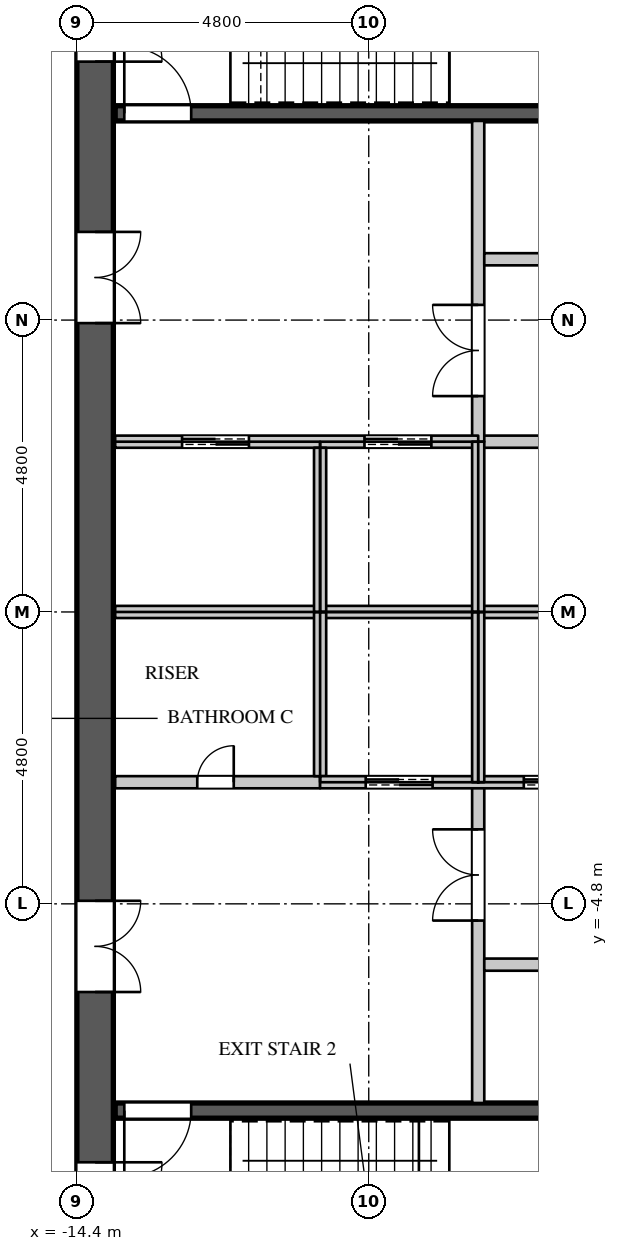
"""IFC4 building model, lengths in metres.
Left out: names, types, materials, properties, quantities, classifications, styles, units other than length and angle.
Written with IfcOpenShell. Run it as: python <this file> out.ifc"""

import sys

from ifc_helpers import new_model, si_unit, direction, frame, frame_2d, origin, place, context, subcontext, project, spatial, rectangle, extrude, element, fill, save


model = new_model("IFC4")
c1 = context("Model", 3, precision=1e-05, world=origin(), true_north=direction((0.0, 1.0)))
c2 = subcontext(c1, "Body", "Model", "MODEL_VIEW")
j1 = project(units=[si_unit("LENGTHUNIT", "METRE"), si_unit("PLANEANGLEUNIT", "RADIAN")], contexts=[c1])
p1 = place(None, origin())
s1 = spatial("IfcSite", under=j1, at=p1, CompositionType="ELEMENT")
p2 = place(p1, origin())
s2 = spatial("IfcBuilding", under=s1, at=p2, CompositionType="ELEMENT")
p3 = place(p2, frame((0.0, 0.0, 218.1)))
s3 = spatial("IfcBuildingStorey", under=s2, at=p3, CompositionType="ELEMENT", Elevation=218.1)
p4 = place(p3, frame((-14.1, -11.4, 0.0), z_axis=(0.0, 0.0, 1.0), x_axis=(0.0, 1.0, 0.0)))
e1 = element("IfcWall", 1, at=p4, inside=s3, PredefinedType="SHEAR", context=c2, shape_type="SweptSolid", body=[
    extrude(rectangle(XDim=22.8, YDim=0.6, at=frame_2d((11.4, 0.0))), origin(), (0.0, 0.0, 1.0), 4.2),
])
p5 = place(p4, frame((20.45, 0.0, 0.0)))
e2 = element("IfcOpeningElement", 2, at=p5, cuts=e1, PredefinedType="OPENING", context=c2, shape_type="SweptSolid", body=[
    extrude(rectangle(XDim=1.1, YDim=2.2, at=frame_2d((0.55, 1.1))), frame((0.0, 0.31, 0.0), z_axis=(0.0, -1.0, 0.0), x_axis=(1.0, 0.0, 0.0)), (0.0, 0.0, 1.0), 0.62),
])
p6 = place(p4, frame((1.25, 0.0, 0.0)))
e3 = element("IfcOpeningElement", 3, at=p6, cuts=e1, PredefinedType="OPENING", context=c2, shape_type="SweptSolid", body=[
    extrude(rectangle(XDim=1.1, YDim=2.2, at=frame_2d((0.55, 1.1))), frame((0.0, 0.31, 0.0), z_axis=(0.0, -1.0, 0.0), x_axis=(1.0, 0.0, 0.0)), (0.0, 0.0, 1.0), 0.62),
])
p7 = place(p4, frame((16.15, 0.0, 0.0)))
e4 = element("IfcOpeningElement", 4, at=p7, cuts=e1, PredefinedType="OPENING", context=c2, shape_type="SweptSolid", body=[
    extrude(rectangle(XDim=1.5, YDim=2.4, at=frame_2d((0.75, 1.2))), frame((0.0, 0.31, 0.0), z_axis=(0.0, -1.0, 0.0), x_axis=(1.0, 0.0, 0.0)), (0.0, 0.0, 1.0), 0.62),
])
p8 = place(p4, frame((5.15, 0.0, 0.0)))
e5 = element("IfcOpeningElement", 5, at=p8, cuts=e1, PredefinedType="OPENING", context=c2, shape_type="SweptSolid", body=[
    extrude(rectangle(XDim=1.5, YDim=2.4, at=frame_2d((0.75, 1.2))), frame((0.0, 0.31, 0.0), z_axis=(0.0, -1.0, 0.0), x_axis=(1.0, 0.0, 0.0)), (0.0, 0.0, 1.0), 0.62),
])
p9 = place(p3, frame((-7.8, 2.8, 0.0), z_axis=(0.0, 0.0, 1.0), x_axis=(1.0, 0.0, 0.0)))
e6 = element("IfcWall", 6, at=p9, inside=s3, PredefinedType="PARTITIONING", context=c2, shape_type="SweptSolid", body=[
    extrude(rectangle(XDim=4.82, YDim=0.2, at=frame_2d((2.41, 0.0))), origin(), (0.0, 0.0, 1.0), 3.95),
])
p10 = place(p9, frame((1.95, 0.0, 0.0)))
e7 = element("IfcOpeningElement", 7, at=p10, cuts=e6, PredefinedType="OPENING", context=c2, shape_type="SweptSolid", body=[
    extrude(rectangle(XDim=0.9, YDim=2.2, at=frame_2d((0.45, 1.1))), frame((0.0, 0.11, 0.0), z_axis=(0.0, -1.0, 0.0), x_axis=(1.0, 0.0, 0.0)), (0.0, 0.0, 1.0), 0.22),
])
p11 = place(p3, frame((-7.8, -8.075, 0.0), z_axis=(0.0, 0.0, 1.0), x_axis=(0.0, 1.0, 0.0)))
e8 = element("IfcWall", 8, at=p11, inside=s3, PredefinedType="PARTITIONING", context=c2, shape_type="SweptSolid", body=[
    extrude(rectangle(XDim=5.275, YDim=0.2, at=frame_2d((2.637, 0.0))), origin(), (0.0, 0.0, 1.0), 3.95),
])
p12 = place(p11, frame((3.0, 0.0, 0.0)))
e9 = element("IfcOpeningElement", 9, at=p12, cuts=e8, PredefinedType="OPENING", context=c2, shape_type="SweptSolid", body=[
    extrude(rectangle(XDim=1.5, YDim=2.4, at=frame_2d((0.75, 1.2))), frame((0.0, 0.11, 0.0), z_axis=(0.0, -1.0, 0.0), x_axis=(1.0, 0.0, 0.0)), (0.0, 0.0, 1.0), 0.22),
])
p13 = place(p3, frame((-7.7, -5.8, 0.0), z_axis=(0.0, 0.0, 1.0), x_axis=(1.0, 0.0, 0.0)))
e10 = element("IfcWall", 10, at=p13, inside=s3, PredefinedType="PARTITIONING", context=c2, shape_type="SweptSolid", body=[
    extrude(rectangle(XDim=21.47, YDim=0.2, at=frame_2d((10.735, 0.0))), origin(), (0.0, 0.0, 1.0), 3.95),
])
p14 = place(p13, frame((1.75, 0.0, 0.0)))
e11 = element("IfcOpeningElement", 11, at=p14, cuts=e10, PredefinedType="OPENING", context=c2, shape_type="SweptSolid", body=[
    extrude(rectangle(XDim=0.9, YDim=2.2, at=frame_2d((0.45, 1.1))), frame((0.0, 0.11, 0.0), z_axis=(0.0, -1.0, 0.0), x_axis=(1.0, 0.0, 0.0)), (0.0, 0.0, 1.0), 0.22),
])
p15 = place(p13, frame((5.95, 0.0, 0.0)))
e12 = element("IfcOpeningElement", 12, at=p15, cuts=e10, PredefinedType="OPENING", context=c2, shape_type="SweptSolid", body=[
    extrude(rectangle(XDim=0.9, YDim=2.2, at=frame_2d((0.45, 1.1))), frame((0.0, 0.11, 0.0), z_axis=(0.0, -1.0, 0.0), x_axis=(1.0, 0.0, 0.0)), (0.0, 0.0, 1.0), 0.22),
])
p16 = place(p13, frame((10.35, 0.0, 0.0)))
e13 = element("IfcOpeningElement", 13, at=p16, cuts=e10, PredefinedType="OPENING", context=c2, shape_type="SweptSolid", body=[
    extrude(rectangle(XDim=0.9, YDim=2.2, at=frame_2d((0.45, 1.1))), frame((0.0, 0.11, 0.0), z_axis=(0.0, -1.0, 0.0), x_axis=(1.0, 0.0, 0.0)), (0.0, 0.0, 1.0), 0.22),
])
p17 = place(p13, frame((14.65, 0.0, 0.0)))
e14 = element("IfcOpeningElement", 14, at=p17, cuts=e10, PredefinedType="OPENING", context=c2, shape_type="SweptSolid", body=[
    extrude(rectangle(XDim=0.9, YDim=2.2, at=frame_2d((0.45, 1.1))), frame((0.0, 0.11, 0.0), z_axis=(0.0, -1.0, 0.0), x_axis=(1.0, 0.0, 0.0)), (0.0, 0.0, 1.0), 0.22),
])
p18 = place(p13, frame((18.75, 0.0, 0.0)))
e15 = element("IfcOpeningElement", 15, at=p18, cuts=e10, PredefinedType="OPENING", context=c2, shape_type="SweptSolid", body=[
    extrude(rectangle(XDim=0.9, YDim=2.2, at=frame_2d((0.45, 1.1))), frame((0.0, 0.11, 0.0), z_axis=(0.0, -1.0, 0.0), x_axis=(1.0, 0.0, 0.0)), (0.0, 0.0, 1.0), 0.22),
])
p19 = place(p3, frame((-7.8, 2.8, 0.0), z_axis=(0.0, 0.0, 1.0), x_axis=(0.0, 1.0, 0.0)))
e16 = element("IfcWall", 16, at=p19, inside=s3, PredefinedType="PARTITIONING", context=c2, shape_type="SweptSolid", body=[
    extrude(rectangle(XDim=5.275, YDim=0.2, at=frame_2d((2.637, 0.0))), origin(), (0.0, 0.0, 1.0), 3.95),
])
p20 = place(p19, frame((0.75, 0.0, 0.0)))
e17 = element("IfcOpeningElement", 17, at=p20, cuts=e16, PredefinedType="OPENING", context=c2, shape_type="SweptSolid", body=[
    extrude(rectangle(XDim=1.5, YDim=2.4, at=frame_2d((0.75, 1.2))), frame((0.0, 0.11, 0.0), z_axis=(0.0, -1.0, 0.0), x_axis=(1.0, 0.0, 0.0)), (0.0, 0.0, 1.0), 0.22),
])
p21 = place(p3, frame((-7.7, 5.8, 0.0), z_axis=(0.0, 0.0, 1.0), x_axis=(1.0, 0.0, 0.0)))
e18 = element("IfcWall", 18, at=p21, inside=s3, PredefinedType="PARTITIONING", context=c2, shape_type="SweptSolid", body=[
    extrude(rectangle(XDim=21.47, YDim=0.2, at=frame_2d((10.735, 0.0))), origin(), (0.0, 0.0, 1.0), 3.95),
])
p22 = place(p21, frame((4.95, 0.0, 0.0)))
e19 = element("IfcOpeningElement", 19, at=p22, cuts=e18, PredefinedType="OPENING", context=c2, shape_type="SweptSolid", body=[
    extrude(rectangle(XDim=0.9, YDim=2.2, at=frame_2d((0.45, 1.1))), frame((0.0, 0.11, 0.0), z_axis=(0.0, -1.0, 0.0), x_axis=(1.0, 0.0, 0.0)), (0.0, 0.0, 1.0), 0.22),
])
p23 = place(p21, frame((15.55, 0.0, 0.0)))
e20 = element("IfcOpeningElement", 20, at=p23, cuts=e18, PredefinedType="OPENING", context=c2, shape_type="SweptSolid", body=[
    extrude(rectangle(XDim=0.9, YDim=2.2, at=frame_2d((0.45, 1.1))), frame((0.0, 0.11, 0.0), z_axis=(0.0, -1.0, 0.0), x_axis=(1.0, 0.0, 0.0)), (0.0, 0.0, 1.0), 0.22),
])
p24 = place(p3, frame((-13.77, -2.8, 0.0), z_axis=(0.0, 0.0, 1.0), x_axis=(1.0, 0.0, 0.0)))
e21 = element("IfcWall", 21, at=p24, inside=s3, PredefinedType="PARTITIONING", context=c2, shape_type="SweptSolid", body=[
    extrude(rectangle(XDim=3.37, YDim=0.2, at=frame_2d((1.685, 0.0))), origin(), (0.0, 0.0, 1.0), 3.95),
])
p25 = place(p24, frame((1.35, 0.0, 0.0)))
e22 = element("IfcOpeningElement", 22, at=p25, cuts=e21, PredefinedType="OPENING", context=c2, shape_type="SweptSolid", body=[
    extrude(rectangle(XDim=0.6, YDim=2.0, at=frame_2d((0.3, 1.0))), frame((0.0, 0.11, 0.0), z_axis=(0.0, -1.0, 0.0), x_axis=(1.0, 0.0, 0.0)), (0.0, 0.0, 1.0), 0.22),
])
p26 = place(p3, frame((-13.77, 0.0, 0.0), z_axis=(0.0, 0.0, 1.0), x_axis=(1.0, 0.0, 0.0)))
e23 = element("IfcWall", 23, at=p26, inside=s3, PredefinedType="PARTITIONING", context=c2, shape_type="SweptSolid", body=[
    extrude(rectangle(XDim=21.57, YDim=0.2, at=frame_2d((10.785, 0.0))), origin(), (0.0, 0.0, 1.0), 3.95),
])
p27 = place(p3, frame((-13.77, 2.8, 0.0), z_axis=(0.0, 0.0, 1.0), x_axis=(1.0, 0.0, 0.0)))
e24 = element("IfcWall", 24, at=p27, inside=s3, PredefinedType="PARTITIONING", context=c2, shape_type="SweptSolid", body=[
    extrude(rectangle(XDim=5.97, YDim=0.2, at=frame_2d((2.985, 0.0))), origin(), (0.0, 0.0, 1.0), 3.95),
])
p28 = place(p27, frame((1.1, 0.0, 0.0)))
e25 = element("IfcOpeningElement", 25, at=p28, cuts=e24, PredefinedType="OPENING", context=c2, shape_type="SweptSolid", body=[
    extrude(rectangle(XDim=1.1, YDim=2.2, at=frame_2d((0.55, 1.1))), frame((0.0, 0.11, 0.0), z_axis=(0.0, -1.0, 0.0), x_axis=(1.0, 0.0, 0.0)), (0.0, 0.0, 1.0), 0.22),
])
p29 = place(p27, frame((4.1, 0.0, 0.0)))
e26 = element("IfcOpeningElement", 26, at=p29, cuts=e24, PredefinedType="OPENING", context=c2, shape_type="SweptSolid", body=[
    extrude(rectangle(XDim=1.1, YDim=2.2, at=frame_2d((0.55, 1.1))), frame((0.0, 0.11, 0.0), z_axis=(0.0, -1.0, 0.0), x_axis=(1.0, 0.0, 0.0)), (0.0, 0.0, 1.0), 0.22),
])
p30 = place(p3, frame((-10.4, -2.7, 0.0), z_axis=(0.0, 0.0, 1.0), x_axis=(0.0, 1.0, 0.0)))
e27 = element("IfcWall", 27, at=p30, inside=s3, PredefinedType="PARTITIONING", context=c2, shape_type="SweptSolid", body=[
    extrude(rectangle(XDim=2.7, YDim=0.2, at=frame_2d((1.35, 0.0))), origin(), (0.0, 0.0, 1.0), 3.95),
])
p31 = place(p3, frame((-10.4, -2.8, 0.0), z_axis=(0.0, 0.0, 1.0), x_axis=(1.0, 0.0, 0.0)))
e28 = element("IfcWall", 28, at=p31, inside=s3, PredefinedType="PARTITIONING", context=c2, shape_type="SweptSolid", body=[
    extrude(rectangle(XDim=18.2, YDim=0.2, at=frame_2d((9.1, 0.0))), origin(), (0.0, 0.0, 1.0), 3.95),
])
p32 = place(p31, frame((0.75, 0.0, 0.0)))
e29 = element("IfcOpeningElement", 29, at=p32, cuts=e28, PredefinedType="OPENING", context=c2, shape_type="SweptSolid", body=[
    extrude(rectangle(XDim=1.1, YDim=2.2, at=frame_2d((0.55, 1.1))), frame((0.0, 0.11, 0.0), z_axis=(0.0, -1.0, 0.0), x_axis=(1.0, 0.0, 0.0)), (0.0, 0.0, 1.0), 0.22),
])
p33 = place(p31, frame((3.35, 0.0, 0.0)))
e30 = element("IfcOpeningElement", 30, at=p33, cuts=e28, PredefinedType="OPENING", context=c2, shape_type="SweptSolid", body=[
    extrude(rectangle(XDim=1.1, YDim=2.2, at=frame_2d((0.55, 1.1))), frame((0.0, 0.11, 0.0), z_axis=(0.0, -1.0, 0.0), x_axis=(1.0, 0.0, 0.0)), (0.0, 0.0, 1.0), 0.22),
])
p34 = place(p31, frame((5.95, 0.0, 0.0)))
e31 = element("IfcOpeningElement", 31, at=p34, cuts=e28, PredefinedType="OPENING", context=c2, shape_type="SweptSolid", body=[
    extrude(rectangle(XDim=1.1, YDim=2.2, at=frame_2d((0.55, 1.1))), frame((0.0, 0.11, 0.0), z_axis=(0.0, -1.0, 0.0), x_axis=(1.0, 0.0, 0.0)), (0.0, 0.0, 1.0), 0.22),
])
p35 = place(p31, frame((8.55, 0.0, 0.0)))
e32 = element("IfcOpeningElement", 32, at=p35, cuts=e28, PredefinedType="OPENING", context=c2, shape_type="SweptSolid", body=[
    extrude(rectangle(XDim=1.1, YDim=2.2, at=frame_2d((0.55, 1.1))), frame((0.0, 0.11, 0.0), z_axis=(0.0, -1.0, 0.0), x_axis=(1.0, 0.0, 0.0)), (0.0, 0.0, 1.0), 0.22),
])
p36 = place(p31, frame((11.15, 0.0, 0.0)))
e33 = element("IfcOpeningElement", 33, at=p36, cuts=e28, PredefinedType="OPENING", context=c2, shape_type="SweptSolid", body=[
    extrude(rectangle(XDim=1.1, YDim=2.2, at=frame_2d((0.55, 1.1))), frame((0.0, 0.11, 0.0), z_axis=(0.0, -1.0, 0.0), x_axis=(1.0, 0.0, 0.0)), (0.0, 0.0, 1.0), 0.22),
])
p37 = place(p31, frame((13.75, 0.0, 0.0)))
e34 = element("IfcOpeningElement", 34, at=p37, cuts=e28, PredefinedType="OPENING", context=c2, shape_type="SweptSolid", body=[
    extrude(rectangle(XDim=1.1, YDim=2.2, at=frame_2d((0.55, 1.1))), frame((0.0, 0.11, 0.0), z_axis=(0.0, -1.0, 0.0), x_axis=(1.0, 0.0, 0.0)), (0.0, 0.0, 1.0), 0.22),
])
p38 = place(p31, frame((16.35, 0.0, 0.0)))
e35 = element("IfcOpeningElement", 35, at=p38, cuts=e28, PredefinedType="OPENING", context=c2, shape_type="SweptSolid", body=[
    extrude(rectangle(XDim=1.1, YDim=2.2, at=frame_2d((0.55, 1.1))), frame((0.0, 0.11, 0.0), z_axis=(0.0, -1.0, 0.0), x_axis=(1.0, 0.0, 0.0)), (0.0, 0.0, 1.0), 0.22),
])
p39 = place(p3, frame((-10.4, 0.0, 0.0), z_axis=(0.0, 0.0, 1.0), x_axis=(0.0, 1.0, 0.0)))
e36 = element("IfcWall", 36, at=p39, inside=s3, PredefinedType="PARTITIONING", context=c2, shape_type="SweptSolid", body=[
    extrude(rectangle(XDim=2.7, YDim=0.2, at=frame_2d((1.35, 0.0))), origin(), (0.0, 0.0, 1.0), 3.95),
])
for number, where, z_axis, x_axis in (
    (37, (-7.8, -2.8, 0.0), (0.0, 0.0, 1.0), (0.0, 1.0, 0.0)),
    (38, (-7.8, 0.0, 0.0), (0.0, 0.0, 1.0), (0.0, 1.0, 0.0)),
):
    element("IfcWall", number, at=place(p3, frame(where, z_axis=z_axis, x_axis=x_axis)), inside=s3, PredefinedType="PARTITIONING", context=c2, shape_type="SweptSolid", body=[
        extrude(rectangle(XDim=2.8, YDim=0.2, at=frame_2d((1.4, 0.0))), origin(), (0.0, 0.0, 1.0), 3.95),
    ])
p40 = place(p3, frame((-13.77, -8.2, 0.0), z_axis=(0.0, 0.0, 1.0), x_axis=(1.0, 0.0, 0.0)))
e39 = element("IfcWall", 39, at=p40, inside=s3, PredefinedType="SHEAR", context=c2, shape_type="SweptSolid", body=[
    extrude(rectangle(XDim=8.495, YDim=0.25, at=frame_2d((4.248, 0.0))), origin(), (0.0, 0.0, 1.0), 3.95),
])
p41 = place(p40, frame((0.15, 0.0, 0.0)))
e40 = element("IfcOpeningElement", 40, at=p41, cuts=e39, PredefinedType="OPENING", context=c2, shape_type="SweptSolid", body=[
    extrude(rectangle(XDim=1.1, YDim=2.2, at=frame_2d((0.55, 1.1))), frame((0.0, 0.135, 0.0), z_axis=(0.0, -1.0, 0.0), x_axis=(1.0, 0.0, 0.0)), (0.0, 0.0, 1.0), 0.27),
])
p42 = place(p3, frame((-13.77, 8.2, 0.0), z_axis=(0.0, 0.0, 1.0), x_axis=(1.0, 0.0, 0.0)))
e41 = element("IfcWall", 41, at=p42, inside=s3, PredefinedType="SHEAR", context=c2, shape_type="SweptSolid", body=[
    extrude(rectangle(XDim=8.495, YDim=0.25, at=frame_2d((4.248, 0.0))), origin(), (0.0, 0.0, 1.0), 3.95),
])
p43 = place(p42, frame((0.15, 0.0, 0.0)))
e42 = element("IfcOpeningElement", 42, at=p43, cuts=e41, PredefinedType="OPENING", context=c2, shape_type="SweptSolid", body=[
    extrude(rectangle(XDim=1.1, YDim=2.2, at=frame_2d((0.55, 1.1))), frame((0.0, 0.135, 0.0), z_axis=(0.0, -1.0, 0.0), x_axis=(1.0, 0.0, 0.0)), (0.0, 0.0, 1.0), 0.27),
])
p44 = place(p25, origin())
e43 = element("IfcDoor", 43, at=p44, inside=s3, OperationType="SINGLE_SWING_RIGHT", PredefinedType="DOOR", context=c2, shape_type="SweptSolid", body=[
    extrude(rectangle(XDim=0.6, YDim=2.0, at=frame_2d((0.3, 1.0))), frame((0.0, 0.025, 0.0), z_axis=(0.0, -1.0, 0.0), x_axis=(1.0, 0.0, 0.0)), (0.0, 0.0, 1.0), 0.05),
])
fill(e22, e43)
p45 = place(p28, origin())
e44 = element("IfcDoor", 44, at=p45, inside=s3, OperationType="DOUBLE_DOOR_SLIDING", PredefinedType="DOOR", context=c2, shape_type="SweptSolid", body=[
    extrude(rectangle(XDim=1.1, YDim=2.2, at=frame_2d((0.55, 1.1))), frame((0.0, 0.025, 0.0), z_axis=(0.0, -1.0, 0.0), x_axis=(1.0, 0.0, 0.0)), (0.0, 0.0, 1.0), 0.05),
])
fill(e25, e44)
p46 = place(p29, origin())
e45 = element("IfcDoor", 45, at=p46, inside=s3, OperationType="DOUBLE_DOOR_SLIDING", PredefinedType="DOOR", context=c2, shape_type="SweptSolid", body=[
    extrude(rectangle(XDim=1.1, YDim=2.2, at=frame_2d((0.55, 1.1))), frame((0.0, 0.025, 0.0), z_axis=(0.0, -1.0, 0.0), x_axis=(1.0, 0.0, 0.0)), (0.0, 0.0, 1.0), 0.05),
])
fill(e26, e45)
p47 = place(p32, origin())
e46 = element("IfcDoor", 46, at=p47, inside=s3, OperationType="DOUBLE_DOOR_SLIDING", PredefinedType="DOOR", context=c2, shape_type="SweptSolid", body=[
    extrude(rectangle(XDim=1.1, YDim=2.2, at=frame_2d((0.55, 1.1))), frame((0.0, 0.025, 0.0), z_axis=(0.0, -1.0, 0.0), x_axis=(1.0, 0.0, 0.0)), (0.0, 0.0, 1.0), 0.05),
])
fill(e29, e46)
p48 = place(p33, origin())
e47 = element("IfcDoor", 47, at=p48, inside=s3, OperationType="DOUBLE_DOOR_SLIDING", PredefinedType="DOOR", context=c2, shape_type="SweptSolid", body=[
    extrude(rectangle(XDim=1.1, YDim=2.2, at=frame_2d((0.55, 1.1))), frame((0.0, 0.025, 0.0), z_axis=(0.0, -1.0, 0.0), x_axis=(1.0, 0.0, 0.0)), (0.0, 0.0, 1.0), 0.05),
])
fill(e30, e47)
p49 = place(p43, origin())
e48 = element("IfcDoor", 48, at=p49, inside=s3, OperationType="SINGLE_SWING_LEFT", PredefinedType="DOOR", context=c2, shape_type="SweptSolid", body=[
    extrude(rectangle(XDim=1.1, YDim=2.2, at=frame_2d((0.55, 1.1))), frame((0.0, 0.025, 0.0), z_axis=(0.0, -1.0, 0.0), x_axis=(1.0, 0.0, 0.0)), (0.0, 0.0, 1.0), 0.05),
])
fill(e42, e48)
p50 = place(p41, origin())
e49 = element("IfcDoor", 49, at=p50, inside=s3, OperationType="SINGLE_SWING_RIGHT", PredefinedType="DOOR", context=c2, shape_type="SweptSolid", body=[
    extrude(rectangle(XDim=1.1, YDim=2.2, at=frame_2d((0.55, 1.1))), frame((0.0, 0.025, 0.0), z_axis=(0.0, -1.0, 0.0), x_axis=(1.0, 0.0, 0.0)), (0.0, 0.0, 1.0), 0.05),
])
fill(e40, e49)
p51 = place(p20, origin())
e50 = element("IfcDoor", 50, at=p51, inside=s3, OperationType="DOUBLE_DOOR_SINGLE_SWING", PredefinedType="DOOR", context=c2, shape_type="SweptSolid", body=[
    extrude(rectangle(XDim=1.5, YDim=2.4, at=frame_2d((0.75, 1.2))), frame((0.0, 0.025, 0.0), z_axis=(0.0, -1.0, 0.0), x_axis=(1.0, 0.0, 0.0)), (0.0, 0.0, 1.0), 0.05),
])
fill(e17, e50)
p52 = place(p12, origin())
e51 = element("IfcDoor", 51, at=p52, inside=s3, OperationType="DOUBLE_DOOR_SINGLE_SWING", PredefinedType="DOOR", context=c2, shape_type="SweptSolid", body=[
    extrude(rectangle(XDim=1.5, YDim=2.4, at=frame_2d((0.75, 1.2))), frame((0.0, 0.025, 0.0), z_axis=(0.0, -1.0, 0.0), x_axis=(1.0, 0.0, 0.0)), (0.0, 0.0, 1.0), 0.05),
])
fill(e9, e51)
p53 = place(p5, origin())
e52 = element("IfcDoor", 52, at=p53, inside=s3, OperationType="SINGLE_SWING_RIGHT", PredefinedType="DOOR", context=c2, shape_type="SweptSolid", body=[
    extrude(rectangle(XDim=1.1, YDim=2.2, at=frame_2d((0.55, 1.1))), frame((0.0, -0.245, 0.0), z_axis=(0.0, -1.0, 0.0), x_axis=(1.0, 0.0, 0.0)), (0.0, 0.0, 1.0), 0.05),
])
fill(e2, e52)
p54 = place(p6, origin())
e53 = element("IfcDoor", 53, at=p54, inside=s3, OperationType="SINGLE_SWING_LEFT", PredefinedType="DOOR", context=c2, shape_type="SweptSolid", body=[
    extrude(rectangle(XDim=1.1, YDim=2.2, at=frame_2d((0.55, 1.1))), frame((0.0, -0.245, 0.0), z_axis=(0.0, -1.0, 0.0), x_axis=(1.0, 0.0, 0.0)), (0.0, 0.0, 1.0), 0.05),
])
fill(e3, e53)
p55 = place(p7, origin())
e54 = element("IfcDoor", 54, at=p55, inside=s3, OperationType="DOUBLE_DOOR_SINGLE_SWING", PredefinedType="DOOR", context=c2, shape_type="SweptSolid", body=[
    extrude(rectangle(XDim=1.5, YDim=2.4, at=frame_2d((0.75, 1.2))), frame((0.0, -0.245, 0.0), z_axis=(0.0, -1.0, 0.0), x_axis=(1.0, 0.0, 0.0)), (0.0, 0.0, 1.0), 0.05),
])
fill(e4, e54)
p56 = place(p8, origin())
e55 = element("IfcDoor", 55, at=p56, inside=s3, OperationType="DOUBLE_DOOR_SINGLE_SWING", PredefinedType="DOOR", context=c2, shape_type="SweptSolid", body=[
    extrude(rectangle(XDim=1.5, YDim=2.4, at=frame_2d((0.75, 1.2))), frame((0.0, -0.245, 0.0), z_axis=(0.0, -1.0, 0.0), x_axis=(1.0, 0.0, 0.0)), (0.0, 0.0, 1.0), 0.05),
])
fill(e5, e55)
save(model, sys.argv[1])
